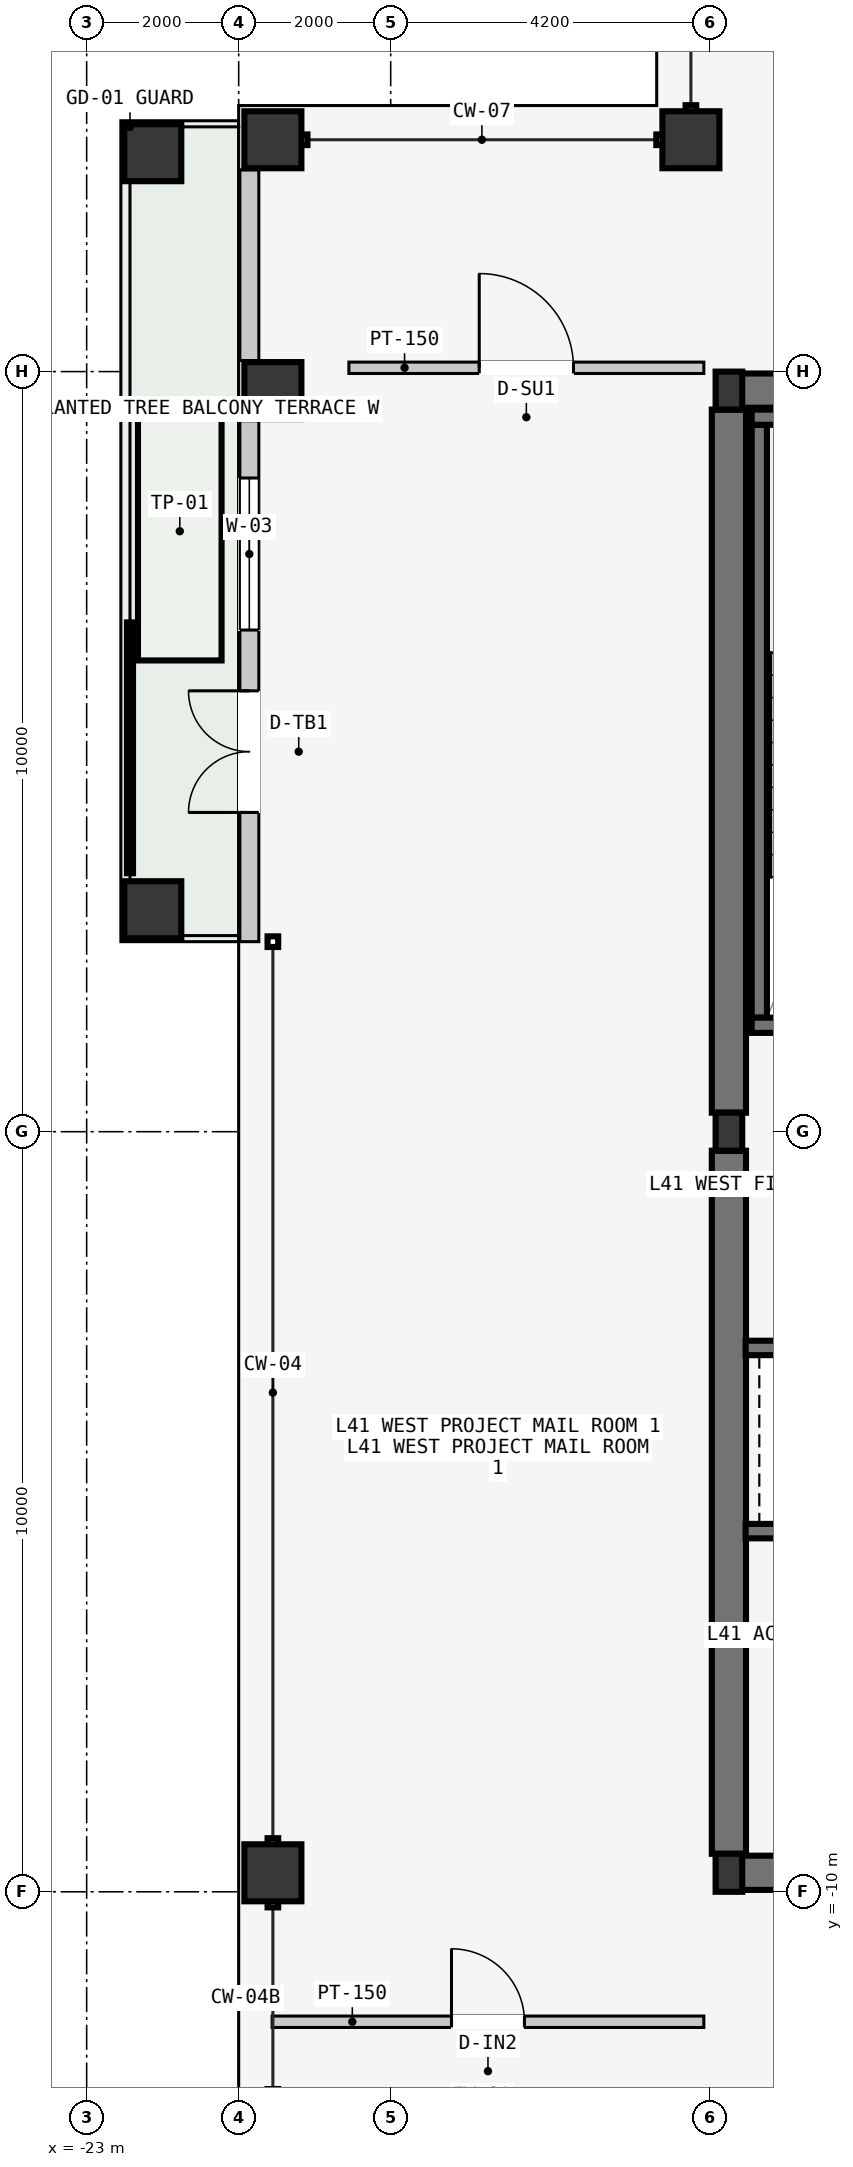
"""IFC4 building model, lengths in metres.
Left out: names, types, materials, properties, quantities, classifications, styles, units other than length and angle.
Written with IfcOpenShell. Run it as: python <this file> out.ifc"""

import sys

from ifc_helpers import new_model, si_unit, direction, frame, frame_2d, origin, origin_2d, place, context, subcontext, project, spatial, rectangle, hollow_rectangle, i_section, extrude, element, fill, save


model = new_model("IFC4")
c1 = context("Model", 3, precision=1e-05, world=origin(), true_north=direction((0.0, 1.0)))
c2 = subcontext(c1, "Body", "Model", "MODEL_VIEW")
j1 = project(units=[si_unit("LENGTHUNIT", "METRE"), si_unit("PLANEANGLEUNIT", "RADIAN")], contexts=[c1])
p1 = place(None, origin())
s1 = spatial("IfcSite", under=j1, at=p1, CompositionType="ELEMENT")
p2 = place(p1, origin())
s2 = spatial("IfcBuilding", under=s1, at=p2, CompositionType="ELEMENT")
p3 = place(p2, frame((0.0, 0.0, 158.7)))
s3 = spatial("IfcBuildingStorey", under=s2, at=p3, CompositionType="ELEMENT", Elevation=158.7)
for number, where, z_axis, x_axis in (
    (1, (-14.53, -9.75, -0.2), (0.0, 0.0, 1.0), (1.0, 0.0, 0.0)),
    (2, (-14.53, 9.75, -0.2), (0.0, 0.0, 1.0), (1.0, 0.0, 0.0)),
):
    element("IfcWall", number, at=place(p3, frame(where, z_axis=z_axis, x_axis=x_axis)), inside=s3, PredefinedType="SHEAR", context=c2, shape_type="SweptSolid", body=[
        extrude(rectangle(XDim=6.46, YDim=0.45, at=frame_2d((3.23, 0.0))), origin(), (0.0, 0.0, 1.0), 3.6),
    ])
for number, where, z_axis, x_axis in (
    (3, (-14.55, -9.5, -0.2), (0.0, 0.0, 1.0), (0.0, 1.0, 0.0)),
    (4, (-14.55, 0.25, -0.2), (0.0, 0.0, 1.0), (0.0, 1.0, 0.0)),
):
    element("IfcWall", number, at=place(p3, frame(where, z_axis=z_axis, x_axis=x_axis)), inside=s3, PredefinedType="SHEAR", context=c2, shape_type="SweptSolid", body=[
        extrude(rectangle(XDim=9.25, YDim=0.45, at=frame_2d((4.625, 0.0))), origin(), (0.0, 0.0, 1.0), 3.6),
    ])
p4 = place(p3, frame((-14.15, 1.5, -0.2), z_axis=(0.0, 0.0, 1.0), x_axis=(0.0, 1.0, 0.0)))
e5 = element("IfcWall", 5, at=p4, inside=s3, PredefinedType="SOLIDWALL", context=c2, shape_type="SweptSolid", body=[
    extrude(rectangle(XDim=7.8, YDim=0.2, at=frame_2d((3.9, 0.0))), origin(), (0.0, 0.0, 1.0), 3.6),
])
p5 = place(p3, frame((-14.25, 1.4, -0.2), z_axis=(0.0, 0.0, 1.0), x_axis=(1.0, 0.0, 0.0)))
e6 = element("IfcWall", 6, at=p5, inside=s3, PredefinedType="SOLIDWALL", context=c2, shape_type="SweptSolid", body=[
    extrude(rectangle(XDim=3.72, YDim=0.2, at=frame_2d((1.86, 0.0))), origin(), (0.0, 0.0, 1.0), 3.6),
])
p6 = place(p5, frame((1.5, 0.0, 0.2)))
e7 = element("IfcOpeningElement", 7, at=p6, cuts=e6, PredefinedType="OPENING", context=c2, shape_type="SweptSolid", body=[
    extrude(rectangle(XDim=1.12, YDim=2.18, at=frame_2d((0.56, 1.09))), frame((0.0, 0.11, 0.0), z_axis=(0.0, -1.0, 0.0), x_axis=(1.0, 0.0, 0.0)), (0.0, 0.0, 1.0), 0.22),
])
p7 = place(p3, frame((-14.25, 9.4, -0.2), z_axis=(0.0, 0.0, 1.0), x_axis=(1.0, 0.0, 0.0)))
e8 = element("IfcWall", 8, at=p7, inside=s3, PredefinedType="SOLIDWALL", context=c2, shape_type="SweptSolid", body=[
    extrude(rectangle(XDim=3.72, YDim=0.2, at=frame_2d((1.86, 0.0))), origin(), (0.0, 0.0, 1.0), 3.6),
])
for number, where, z_axis, x_axis in (
    (9, (-14.55, -9.75, 0.0), (0.0, 0.0, 1.0), (1.0, 0.0, 0.0)),
    (10, (-14.55, 0.0, 0.0), (0.0, 0.0, 1.0), (1.0, 0.0, 0.0)),
    (11, (-14.55, 9.75, 0.0), (0.0, 0.0, 1.0), (1.0, 0.0, 0.0)),
):
    element("IfcColumn", number, at=place(p3, frame(where, z_axis=z_axis, x_axis=x_axis)), inside=s3, PredefinedType="COLUMN", context=c2, shape_type="SweptSolid", body=[
        extrude(i_section(OverallWidth=0.35, OverallDepth=0.5, WebThickness=0.02, FlangeThickness=0.032, at=origin_2d()), origin(), (0.0, 0.0, 1.0), 3.6),
    ])
for number, where, z_axis, x_axis in (
    (12, (-20.55, -9.75, 0.0), (0.0, 0.0, 1.0), (0.0, 1.0, 0.0)),
    (13, (-20.55, 9.75, 0.0), (0.0, 0.0, 1.0), (0.0, 1.0, 0.0)),
    (14, (-20.55, 13.05, 0.0), (0.0, 0.0, 1.0), (0.0, 1.0, 0.0)),
    (15, (-15.05, 13.05, 0.0), (0.0, 0.0, 1.0), (1.0, 0.0, 0.0)),
):
    element("IfcColumn", number, at=place(p3, frame(where, z_axis=z_axis, x_axis=x_axis)), inside=s3, PredefinedType="COLUMN", context=c2, shape_type="SweptSolid", body=[
        extrude(hollow_rectangle(XDim=0.75, YDim=0.75, WallThickness=0.032, at=origin_2d()), origin(), (0.0, 0.0, 1.0), 3.6),
    ])
for number, where, z_axis, x_axis in (
    (16, (-22.13, 2.92, -0.2), (0.0, 0.0, 1.0), (0.0, 1.0, 0.0)),
    (17, (-22.13, 12.88, -0.2), (0.0, 0.0, 1.0), (0.0, 1.0, 0.0)),
):
    element("IfcColumn", number, at=place(p3, frame(where, z_axis=z_axis, x_axis=x_axis)), inside=s3, PredefinedType="COLUMN", context=c2, shape_type="SweptSolid", body=[
        extrude(hollow_rectangle(XDim=0.75, YDim=0.75, WallThickness=0.032, at=origin_2d()), origin(), (0.0, 0.0, 1.0), 3.8),
    ])
p8 = place(p3, frame((-20.86, 2.5, 0.0), z_axis=(0.0, 0.0, 1.0), x_axis=(0.0, 1.0, 0.0)))
e18 = element("IfcWall", 18, at=p8, inside=s3, PredefinedType="STANDARD", context=c2, shape_type="SweptSolid", body=[
    extrude(rectangle(XDim=6.855, YDim=0.25, at=frame_2d((3.427, 0.0))), origin(), (0.0, 0.0, 1.0), 3.4),
])
p9 = place(p8, frame((1.7, 0.0, 0.0)))
e19 = element("IfcOpeningElement", 19, at=p9, cuts=e18, PredefinedType="OPENING", context=c2, shape_type="SweptSolid", body=[
    extrude(rectangle(XDim=1.6, YDim=2.2, at=frame_2d((0.8, 1.1))), frame((0.0, 0.135, 0.0), z_axis=(0.0, -1.0, 0.0), x_axis=(1.0, 0.0, 0.0)), (0.0, 0.0, 1.0), 0.27),
])
p10 = place(p8, frame((4.1, 0.0, 0.85)))
e20 = element("IfcOpeningElement", 20, at=p10, cuts=e18, PredefinedType="OPENING", context=c2, shape_type="SweptSolid", body=[
    extrude(rectangle(XDim=2.0, YDim=2.1, at=frame_2d((1.0, 1.05))), frame((0.0, 0.135, 0.0), z_axis=(0.0, -1.0, 0.0), x_axis=(1.0, 0.0, 0.0)), (0.0, 0.0, 1.0), 0.27),
])
p11 = place(p3, frame((-20.86, 10.145, 0.0), z_axis=(0.0, 0.0, 1.0), x_axis=(0.0, 1.0, 0.0)))
e21 = element("IfcWall", 21, at=p11, inside=s3, PredefinedType="STANDARD", context=c2, shape_type="SweptSolid", body=[
    extrude(rectangle(XDim=2.51, YDim=0.25, at=frame_2d((1.255, 0.0))), origin(), (0.0, 0.0, 1.0), 3.4),
])
p12 = place(p3, frame((-14.33, -2.845, -0.2), z_axis=(0.0, 0.0, 1.0), x_axis=(1.0, 0.0, 0.0)))
e22 = element("IfcWall", 22, at=p12, inside=s3, PredefinedType="SOLIDWALL", context=c2, shape_type="SweptSolid", body=[
    extrude(rectangle(XDim=2.68, YDim=0.19, at=frame_2d((1.34, 0.0))), origin(), (0.0, 0.0, 1.0), 3.6),
])
p13 = place(p12, frame((0.83, 0.0, 0.2)))
e23 = element("IfcOpeningElement", 23, at=p13, cuts=e22, PredefinedType="OPENING", context=c2, shape_type="SweptSolid", body=[
    extrude(rectangle(XDim=1.2, YDim=2.2, at=frame_2d((0.6, 1.1))), frame((0.0, 0.105, 0.0), z_axis=(0.0, -1.0, 0.0), x_axis=(1.0, 0.0, 0.0)), (0.0, 0.0, 1.0), 0.21),
])
p14 = place(p3, frame((-14.33, -5.255, -0.2), z_axis=(0.0, 0.0, 1.0), x_axis=(1.0, 0.0, 0.0)))
e24 = element("IfcWall", 24, at=p14, inside=s3, PredefinedType="SOLIDWALL", context=c2, shape_type="SweptSolid", body=[
    extrude(rectangle(XDim=2.68, YDim=0.19, at=frame_2d((1.34, 0.0))), origin(), (0.0, 0.0, 1.0), 3.6),
])
p15 = place(p3, frame((-19.55, 10.05, 0.0), z_axis=(0.0, 0.0, 1.0), x_axis=(1.0, 0.0, 0.0)))
e25 = element("IfcWall", 25, at=p15, inside=s3, PredefinedType="PARTITIONING", context=c2, shape_type="SweptSolid", body=[
    extrude(rectangle(XDim=4.67, YDim=0.15, at=frame_2d((2.335, 0.0))), origin(), (0.0, 0.0, 1.0), 3.4),
])
p16 = place(p15, frame((1.715, 0.0, 0.0)))
e26 = element("IfcOpeningElement", 26, at=p16, cuts=e25, PredefinedType="OPENING", context=c2, shape_type="SweptSolid", body=[
    extrude(rectangle(XDim=1.24, YDim=2.24, at=frame_2d((0.62, 1.12))), frame((0.0, 0.085, 0.0), z_axis=(0.0, -1.0, 0.0), x_axis=(1.0, 0.0, 0.0)), (0.0, 0.0, 1.0), 0.17),
])
p17 = place(p3, frame((-20.56, -11.71, 0.0), z_axis=(0.0, 0.0, 1.0), x_axis=(1.0, 0.0, 0.0)))
e27 = element("IfcWall", 27, at=p17, inside=s3, PredefinedType="PARTITIONING", context=c2, shape_type="SweptSolid", body=[
    extrude(rectangle(XDim=5.68, YDim=0.15, at=frame_2d((2.84, 0.0))), origin(), (0.0, 0.0, 1.0), 3.4),
])
p18 = place(p17, frame((2.36, 0.0, 0.0)))
e28 = element("IfcOpeningElement", 28, at=p18, cuts=e27, PredefinedType="OPENING", context=c2, shape_type="SweptSolid", body=[
    extrude(rectangle(XDim=0.96, YDim=2.18, at=frame_2d((0.48, 1.09))), frame((0.0, 0.085, 0.0), z_axis=(0.0, -1.0, 0.0), x_axis=(1.0, 0.0, 0.0)), (0.0, 0.0, 1.0), 0.17),
])
p19 = place(p9, origin())
e29 = element("IfcDoor", 29, at=p19, inside=s3, OperationType="DOUBLE_DOOR_SINGLE_SWING", PredefinedType="DOOR", context=c2, shape_type="SweptSolid", body=[
    extrude(rectangle(XDim=1.6, YDim=2.2, at=frame_2d((0.8, 1.1))), frame((0.0, 0.025, 0.0), z_axis=(0.0, -1.0, 0.0), x_axis=(1.0, 0.0, 0.0)), (0.0, 0.0, 1.0), 0.05),
])
fill(e19, e29)
p20 = place(p10, origin())
e30 = element("IfcWindow", 30, at=p20, inside=s3, PartitioningType="SINGLE_PANEL", PredefinedType="WINDOW", context=c2, shape_type="SweptSolid", body=[
    extrude(rectangle(XDim=2.0, YDim=2.1, at=frame_2d((1.0, 1.05))), frame((0.0, 0.03, 0.0), z_axis=(0.0, -1.0, 0.0), x_axis=(1.0, 0.0, 0.0)), (0.0, 0.0, 1.0), 0.06),
])
fill(e20, e30)
p21 = place(p16, origin())
e31 = element("IfcDoor", 31, at=p21, inside=s3, OperationType="SINGLE_SWING_LEFT", PredefinedType="DOOR", context=c2, shape_type="SweptSolid", body=[
    extrude(rectangle(XDim=1.24, YDim=2.24, at=frame_2d((0.62, 1.12))), frame((0.0, 0.025, 0.0), z_axis=(0.0, -1.0, 0.0), x_axis=(1.0, 0.0, 0.0)), (0.0, 0.0, 1.0), 0.05),
])
fill(e26, e31)
p22 = place(p18, origin())
e32 = element("IfcDoor", 32, at=p22, inside=s3, OperationType="SINGLE_SWING_LEFT", PredefinedType="DOOR", context=c2, shape_type="SweptSolid", body=[
    extrude(rectangle(XDim=0.96, YDim=2.18, at=frame_2d((0.48, 1.09))), frame((0.0, 0.025, 0.0), z_axis=(0.0, -1.0, 0.0), x_axis=(1.0, 0.0, 0.0)), (0.0, 0.0, 1.0), 0.05),
])
fill(e28, e32)
save(model, sys.argv[1])
